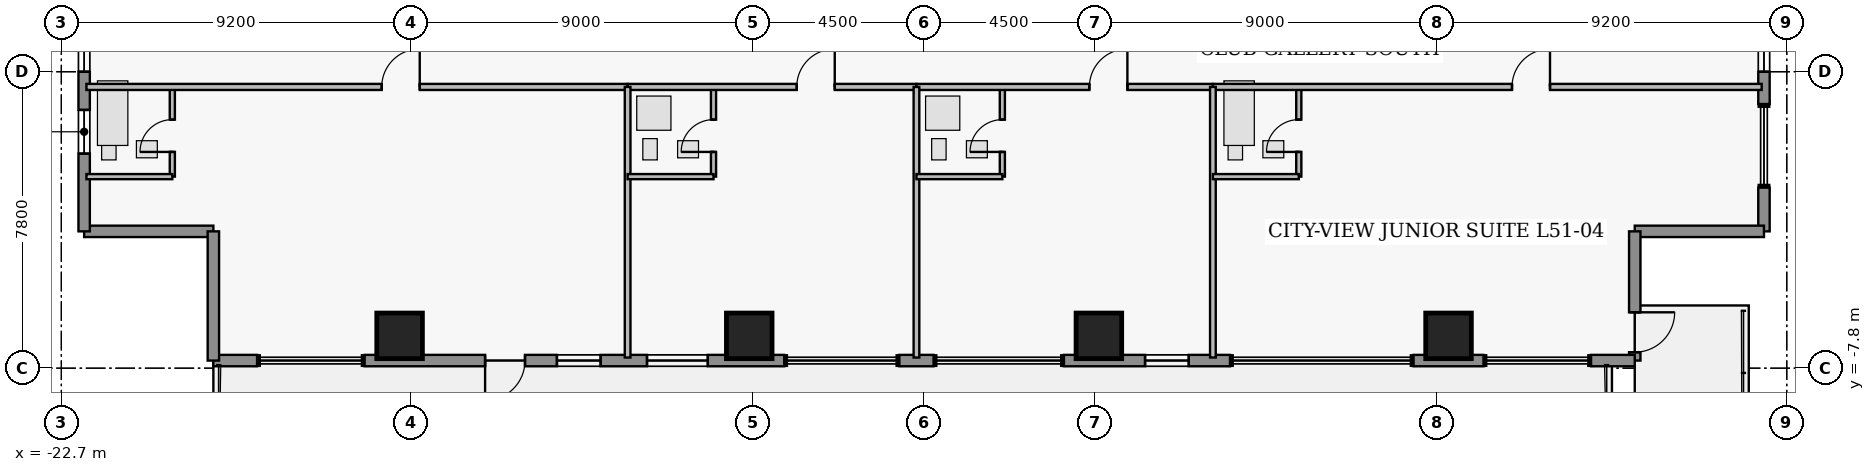
"""IFC4 building model, lengths in metres.
Left out: names, types, materials, properties, quantities, classifications, styles, units other than length and angle.
Written with IfcOpenShell. Run it as: python <this file> out.ifc"""

import sys

from ifc_helpers import new_model, si_unit, direction, frame, frame_2d, origin, origin_2d, place, context, subcontext, project, spatial, rectangle, extrude, element, fill, save


model = new_model("IFC4")
c1 = context("Model", 3, precision=1e-05, world=origin(), true_north=direction((0.0, 1.0)))
c2 = subcontext(c1, "Body", "Model", "MODEL_VIEW")
j1 = project(units=[si_unit("LENGTHUNIT", "METRE"), si_unit("PLANEANGLEUNIT", "RADIAN")], contexts=[c1])
p1 = place(None, origin())
s1 = spatial("IfcSite", under=j1, at=p1, CompositionType="ELEMENT")
p2 = place(p1, origin())
s2 = spatial("IfcBuilding", under=s1, at=p2, CompositionType="ELEMENT")
p3 = place(p2, frame((0.0, 0.0, 203.65)))
s3 = spatial("IfcBuildingStorey", under=s2, at=p3, CompositionType="ELEMENT", Elevation=203.65)
for number, where, z_axis, x_axis in (
    (1, (-13.8, -6.95, 0.0), (0.0, 0.0, 1.0), (1.0, 0.0, 0.0)),
    (2, (-4.6, -6.95, 0.0), (0.0, 0.0, 1.0), (1.0, 0.0, 0.0)),
    (3, (4.6, -6.95, 0.0), (0.0, 0.0, 1.0), (1.0, 0.0, 0.0)),
    (4, (13.8, -6.95, 0.0), (0.0, 0.0, 1.0), (1.0, 0.0, 0.0)),
):
    element("IfcColumn", number, at=place(p3, frame(where, z_axis=z_axis, x_axis=x_axis)), inside=s3, PredefinedType="COLUMN", context=c2, shape_type="SweptSolid", body=[
        extrude(rectangle(XDim=1.2, YDim=1.2, at=origin_2d()), origin(), (0.0, 0.0, 1.0), 3.75),
    ])
p4 = place(p3, frame((-18.7, -4.2, 0.0), z_axis=(0.0, 0.0, 1.0), x_axis=(-1.0, 0.0, 0.0)))
e5 = element("IfcWall", 5, at=p4, inside=s3, PredefinedType="STANDARD", context=c2, shape_type="SweptSolid", body=[
    extrude(rectangle(XDim=3.4, YDim=0.3, at=frame_2d((1.7, 0.0))), origin(), (0.0, 0.0, 1.0), 3.53),
])
p5 = place(p3, frame((-22.1, -4.2, 0.0), z_axis=(0.0, 0.0, 1.0), x_axis=(0.0, 1.0, 0.0)))
e6 = element("IfcWall", 6, at=p5, inside=s3, PredefinedType="STANDARD", context=c2, shape_type="SweptSolid", body=[
    extrude(rectangle(XDim=6.2, YDim=0.3, at=frame_2d((3.1, 0.0))), origin(), (0.0, 0.0, 1.0), 3.53),
])
p6 = place(p5, frame((2.045, 0.0, 0.95)))
e7 = element("IfcOpeningElement", 7, at=p6, cuts=e6, PredefinedType="OPENING", context=c2, shape_type="SweptSolid", body=[
    extrude(rectangle(XDim=1.15, YDim=1.55, at=frame_2d((0.575, 0.775))), frame((0.0, 0.16, 0.0), z_axis=(0.0, -1.0, 0.0), x_axis=(1.0, 0.0, 0.0)), (0.0, 0.0, 1.0), 0.32),
])
p7 = place(p5, frame((4.2, 0.0, 0.95)))
e8 = element("IfcOpeningElement", 8, at=p7, cuts=e6, PredefinedType="OPENING", context=c2, shape_type="SweptSolid", body=[
    extrude(rectangle(XDim=1.15, YDim=1.55, at=frame_2d((0.575, 0.775))), frame((0.0, 0.16, 0.0), z_axis=(0.0, -1.0, 0.0), x_axis=(1.0, 0.0, 0.0)), (0.0, 0.0, 1.0), 0.32),
])
p8 = place(p3, frame((22.1, 2.0, 0.0), z_axis=(0.0, 0.0, 1.0), x_axis=(0.0, -1.0, 0.0)))
e9 = element("IfcWall", 9, at=p8, inside=s3, PredefinedType="STANDARD", context=c2, shape_type="SweptSolid", body=[
    extrude(rectangle(XDim=2.85, YDim=0.3, at=frame_2d((1.425, 0.0))), origin(), (0.0, 0.0, 1.0), 3.53),
])
p9 = place(p8, frame((0.85, 0.0, 0.95)))
e10 = element("IfcOpeningElement", 10, at=p9, cuts=e9, PredefinedType="OPENING", context=c2, shape_type="SweptSolid", body=[
    extrude(rectangle(XDim=1.15, YDim=1.55, at=frame_2d((0.575, 0.775))), frame((0.0, 0.16, 0.0), z_axis=(0.0, -1.0, 0.0), x_axis=(1.0, 0.0, 0.0)), (0.0, 0.0, 1.0), 0.32),
])
p10 = place(p3, frame((22.1, -3.05, 0.0), z_axis=(0.0, 0.0, 1.0), x_axis=(0.0, -1.0, 0.0)))
e11 = element("IfcWall", 11, at=p10, inside=s3, PredefinedType="STANDARD", context=c2, shape_type="SweptSolid", body=[
    extrude(rectangle(XDim=1.15, YDim=0.3, at=frame_2d((0.575, 0.0))), origin(), (0.0, 0.0, 1.0), 3.53),
])
p11 = place(p3, frame((22.1, -4.2, 0.0), z_axis=(0.0, 0.0, 1.0), x_axis=(-1.0, 0.0, 0.0)))
e12 = element("IfcWall", 12, at=p11, inside=s3, PredefinedType="STANDARD", context=c2, shape_type="SweptSolid", body=[
    extrude(rectangle(XDim=3.4, YDim=0.3, at=frame_2d((1.7, 0.0))), origin(), (0.0, 0.0, 1.0), 3.53),
])
p12 = place(p3, frame((18.7, -4.2, 0.0), z_axis=(0.0, 0.0, 1.0), x_axis=(0.0, -1.0, 0.0)))
e13 = element("IfcWall", 13, at=p12, inside=s3, PredefinedType="STANDARD", context=c2, shape_type="SweptSolid", body=[
    extrude(rectangle(XDim=3.4, YDim=0.3, at=frame_2d((1.7, 0.0))), origin(), (0.0, 0.0, 1.0), 3.53),
])
p13 = place(p12, frame((2.13, 0.0, 0.0)))
e14 = element("IfcOpeningElement", 14, at=p13, cuts=e13, PredefinedType="OPENING", context=c2, shape_type="SweptSolid", body=[
    extrude(rectangle(XDim=1.05, YDim=2.2, at=frame_2d((0.525, 1.1))), frame((0.0, 0.16, 0.0), z_axis=(0.0, -1.0, 0.0), x_axis=(1.0, 0.0, 0.0)), (0.0, 0.0, 1.0), 0.32),
])
p14 = place(p3, frame((18.7, -7.6, 0.0), z_axis=(0.0, 0.0, 1.0), x_axis=(-1.0, 0.0, 0.0)))
e15 = element("IfcWall", 15, at=p14, inside=s3, PredefinedType="STANDARD", context=c2, shape_type="SweptSolid", body=[
    extrude(rectangle(XDim=1.15, YDim=0.3, at=frame_2d((0.575, 0.0))), origin(), (0.0, 0.0, 1.0), 3.53),
])
p15 = place(p3, frame((14.72, -7.6, 0.0), z_axis=(0.0, 0.0, 1.0), x_axis=(-1.0, 0.0, 0.0)))
e16 = element("IfcWall", 16, at=p15, inside=s3, PredefinedType="STANDARD", context=c2, shape_type="SweptSolid", body=[
    extrude(rectangle(XDim=1.84, YDim=0.3, at=frame_2d((0.92, 0.0))), origin(), (0.0, 0.0, 1.0), 3.53),
])
p16 = place(p3, frame((8.05, -7.6, 0.0), z_axis=(0.0, 0.0, 1.0), x_axis=(-1.0, 0.0, 0.0)))
e17 = element("IfcWall", 17, at=p16, inside=s3, PredefinedType="STANDARD", context=c2, shape_type="SweptSolid", body=[
    extrude(rectangle(XDim=4.37, YDim=0.3, at=frame_2d((2.185, 0.0))), origin(), (0.0, 0.0, 1.0), 3.53),
])
p17 = place(p16, frame((1.085, 0.0, 0.95)))
e18 = element("IfcOpeningElement", 18, at=p17, cuts=e17, PredefinedType="OPENING", context=c2, shape_type="SweptSolid", body=[
    extrude(rectangle(XDim=1.15, YDim=1.55, at=frame_2d((0.575, 0.775))), frame((0.0, 0.16, 0.0), z_axis=(0.0, -1.0, 0.0), x_axis=(1.0, 0.0, 0.0)), (0.0, 0.0, 1.0), 0.32),
])
p18 = place(p3, frame((0.25, -7.6, 0.0), z_axis=(0.0, 0.0, 1.0), x_axis=(-1.0, 0.0, 0.0)))
e19 = element("IfcWall", 19, at=p18, inside=s3, PredefinedType="STANDARD", context=c2, shape_type="SweptSolid", body=[
    extrude(rectangle(XDim=0.9, YDim=0.3, at=frame_2d((0.45, 0.0))), origin(), (0.0, 0.0, 1.0), 3.53),
])
p19 = place(p3, frame((-3.68, -7.6, 0.0), z_axis=(0.0, 0.0, 1.0), x_axis=(-1.0, 0.0, 0.0)))
e20 = element("IfcWall", 20, at=p19, inside=s3, PredefinedType="STANDARD", context=c2, shape_type="SweptSolid", body=[
    extrude(rectangle(XDim=11.04, YDim=0.3, at=frame_2d((5.52, 0.0))), origin(), (0.0, 0.0, 1.0), 3.53),
])
p20 = place(p19, frame((6.82, 0.0, 0.0)))
e21 = element("IfcOpeningElement", 21, at=p20, cuts=e20, PredefinedType="OPENING", context=c2, shape_type="SweptSolid", body=[
    extrude(rectangle(XDim=1.05, YDim=2.2, at=frame_2d((0.525, 1.1))), frame((0.0, 0.16, 0.0), z_axis=(0.0, -1.0, 0.0), x_axis=(1.0, 0.0, 0.0)), (0.0, 0.0, 1.0), 0.32),
])
p21 = place(p19, frame((2.01, 0.0, 0.85)))
e22 = element("IfcOpeningElement", 22, at=p21, cuts=e20, PredefinedType="OPENING", context=c2, shape_type="SweptSolid", body=[
    extrude(rectangle(XDim=1.6, YDim=1.8, at=frame_2d((0.8, 0.9))), frame((0.0, 0.16, 0.0), z_axis=(0.0, -1.0, 0.0), x_axis=(1.0, 0.0, 0.0)), (0.0, 0.0, 1.0), 0.32),
])
p22 = place(p19, frame((4.83, 0.0, 0.95)))
e23 = element("IfcOpeningElement", 23, at=p22, cuts=e20, PredefinedType="OPENING", context=c2, shape_type="SweptSolid", body=[
    extrude(rectangle(XDim=1.15, YDim=1.55, at=frame_2d((0.575, 0.775))), frame((0.0, 0.16, 0.0), z_axis=(0.0, -1.0, 0.0), x_axis=(1.0, 0.0, 0.0)), (0.0, 0.0, 1.0), 0.32),
])
p23 = place(p3, frame((-17.55, -7.6, 0.0), z_axis=(0.0, 0.0, 1.0), x_axis=(-1.0, 0.0, 0.0)))
e24 = element("IfcWall", 24, at=p23, inside=s3, PredefinedType="STANDARD", context=c2, shape_type="SweptSolid", body=[
    extrude(rectangle(XDim=1.15, YDim=0.3, at=frame_2d((0.575, 0.0))), origin(), (0.0, 0.0, 1.0), 3.53),
])
p24 = place(p3, frame((-18.7, -7.6, 0.0), z_axis=(0.0, 0.0, 1.0), x_axis=(0.0, 1.0, 0.0)))
e25 = element("IfcWall", 25, at=p24, inside=s3, PredefinedType="STANDARD", context=c2, shape_type="SweptSolid", body=[
    extrude(rectangle(XDim=3.4, YDim=0.3, at=frame_2d((1.7, 0.0))), origin(), (0.0, 0.0, 1.0), 3.53),
])
p25 = place(p3, frame((-19.78, -2.76, 0.0), z_axis=(0.0, 0.0, 1.0), x_axis=(0.0, 1.0, 0.0)))
e26 = element("IfcWall", 26, at=p25, inside=s3, PredefinedType="PLUMBINGWALL", context=c2, shape_type="SweptSolid", body=[
    extrude(rectangle(XDim=2.36, YDim=0.135, at=frame_2d((1.18, 0.0))), origin(), (0.0, 0.0, 1.0), 3.53),
])
p26 = place(p25, frame((0.65, 0.0, 0.0)))
e27 = element("IfcOpeningElement", 27, at=p26, cuts=e26, PredefinedType="OPENING", context=c2, shape_type="SweptSolid", body=[
    extrude(rectangle(XDim=0.85, YDim=2.1, at=frame_2d((0.425, 1.05))), frame((0.0, 0.077, 0.0), z_axis=(0.0, -1.0, 0.0), x_axis=(1.0, 0.0, 0.0)), (0.0, 0.0, 1.0), 0.155),
])
p27 = place(p3, frame((-22.04, -0.4, 0.0), z_axis=(0.0, 0.0, 1.0), x_axis=(1.0, 0.0, 0.0)))
e28 = element("IfcWall", 28, at=p27, inside=s3, PredefinedType="PARTITIONING", context=c2, shape_type="SweptSolid", body=[
    extrude(rectangle(XDim=14.24, YDim=0.16, at=frame_2d((7.12, 0.0))), origin(), (0.0, 0.0, 1.0), 3.53),
])
p28 = place(p27, frame((7.77, 0.0, 0.0)))
e29 = element("IfcOpeningElement", 29, at=p28, cuts=e28, PredefinedType="OPENING", context=c2, shape_type="SweptSolid", body=[
    extrude(rectangle(XDim=1.0, YDim=2.15, at=frame_2d((0.5, 1.075))), frame((0.0, 0.09, 0.0), z_axis=(0.0, -1.0, 0.0), x_axis=(1.0, 0.0, 0.0)), (0.0, 0.0, 1.0), 0.18),
])
p29 = place(p3, frame((-5.54, -2.76, 0.0), z_axis=(0.0, 0.0, 1.0), x_axis=(0.0, 1.0, 0.0)))
e30 = element("IfcWall", 30, at=p29, inside=s3, PredefinedType="PLUMBINGWALL", context=c2, shape_type="SweptSolid", body=[
    extrude(rectangle(XDim=2.36, YDim=0.135, at=frame_2d((1.18, 0.0))), origin(), (0.0, 0.0, 1.0), 3.53),
])
p30 = place(p29, frame((0.65, 0.0, 0.0)))
e31 = element("IfcOpeningElement", 31, at=p30, cuts=e30, PredefinedType="OPENING", context=c2, shape_type="SweptSolid", body=[
    extrude(rectangle(XDim=0.85, YDim=2.1, at=frame_2d((0.425, 1.05))), frame((0.0, 0.077, 0.0), z_axis=(0.0, -1.0, 0.0), x_axis=(1.0, 0.0, 0.0)), (0.0, 0.0, 1.0), 0.155),
])
p31 = place(p3, frame((-7.8, -0.4, 0.0), z_axis=(0.0, 0.0, 1.0), x_axis=(1.0, 0.0, 0.0)))
e32 = element("IfcWall", 32, at=p31, inside=s3, PredefinedType="PARTITIONING", context=c2, shape_type="SweptSolid", body=[
    extrude(rectangle(XDim=7.6, YDim=0.16, at=frame_2d((3.8, 0.0))), origin(), (0.0, 0.0, 1.0), 3.53),
])
p32 = place(p31, frame((4.45, 0.0, 0.0)))
e33 = element("IfcOpeningElement", 33, at=p32, cuts=e32, PredefinedType="OPENING", context=c2, shape_type="SweptSolid", body=[
    extrude(rectangle(XDim=1.0, YDim=2.15, at=frame_2d((0.5, 1.075))), frame((0.0, 0.09, 0.0), z_axis=(0.0, -1.0, 0.0), x_axis=(1.0, 0.0, 0.0)), (0.0, 0.0, 1.0), 0.18),
])
p33 = place(p3, frame((2.06, -2.76, 0.0), z_axis=(0.0, 0.0, 1.0), x_axis=(0.0, 1.0, 0.0)))
e34 = element("IfcWall", 34, at=p33, inside=s3, PredefinedType="PLUMBINGWALL", context=c2, shape_type="SweptSolid", body=[
    extrude(rectangle(XDim=2.36, YDim=0.135, at=frame_2d((1.18, 0.0))), origin(), (0.0, 0.0, 1.0), 3.53),
])
p34 = place(p33, frame((0.65, 0.0, 0.0)))
e35 = element("IfcOpeningElement", 35, at=p34, cuts=e34, PredefinedType="OPENING", context=c2, shape_type="SweptSolid", body=[
    extrude(rectangle(XDim=0.85, YDim=2.1, at=frame_2d((0.425, 1.05))), frame((0.0, 0.077, 0.0), z_axis=(0.0, -1.0, 0.0), x_axis=(1.0, 0.0, 0.0)), (0.0, 0.0, 1.0), 0.155),
])
p35 = place(p3, frame((-0.2, -0.4, 0.0), z_axis=(0.0, 0.0, 1.0), x_axis=(1.0, 0.0, 0.0)))
e36 = element("IfcWall", 36, at=p35, inside=s3, PredefinedType="PARTITIONING", context=c2, shape_type="SweptSolid", body=[
    extrude(rectangle(XDim=7.8, YDim=0.16, at=frame_2d((3.9, 0.0))), origin(), (0.0, 0.0, 1.0), 3.53),
])
p36 = place(p35, frame((4.55, 0.0, 0.0)))
e37 = element("IfcOpeningElement", 37, at=p36, cuts=e36, PredefinedType="OPENING", context=c2, shape_type="SweptSolid", body=[
    extrude(rectangle(XDim=1.0, YDim=2.15, at=frame_2d((0.5, 1.075))), frame((0.0, 0.09, 0.0), z_axis=(0.0, -1.0, 0.0), x_axis=(1.0, 0.0, 0.0)), (0.0, 0.0, 1.0), 0.18),
])
p37 = place(p3, frame((9.86, -2.76, 0.0), z_axis=(0.0, 0.0, 1.0), x_axis=(0.0, 1.0, 0.0)))
e38 = element("IfcWall", 38, at=p37, inside=s3, PredefinedType="PLUMBINGWALL", context=c2, shape_type="SweptSolid", body=[
    extrude(rectangle(XDim=2.36, YDim=0.135, at=frame_2d((1.18, 0.0))), origin(), (0.0, 0.0, 1.0), 3.53),
])
p38 = place(p37, frame((0.65, 0.0, 0.0)))
e39 = element("IfcOpeningElement", 39, at=p38, cuts=e38, PredefinedType="OPENING", context=c2, shape_type="SweptSolid", body=[
    extrude(rectangle(XDim=0.85, YDim=2.1, at=frame_2d((0.425, 1.05))), frame((0.0, 0.077, 0.0), z_axis=(0.0, -1.0, 0.0), x_axis=(1.0, 0.0, 0.0)), (0.0, 0.0, 1.0), 0.155),
])
p39 = place(p3, frame((7.6, -0.4, 0.0), z_axis=(0.0, 0.0, 1.0), x_axis=(1.0, 0.0, 0.0)))
e40 = element("IfcWall", 40, at=p39, inside=s3, PredefinedType="PARTITIONING", context=c2, shape_type="SweptSolid", body=[
    extrude(rectangle(XDim=14.44, YDim=0.16, at=frame_2d((7.22, 0.0))), origin(), (0.0, 0.0, 1.0), 3.53),
])
p40 = place(p39, frame((7.87, 0.0, 0.0)))
e41 = element("IfcOpeningElement", 41, at=p40, cuts=e40, PredefinedType="OPENING", context=c2, shape_type="SweptSolid", body=[
    extrude(rectangle(XDim=1.0, YDim=2.15, at=frame_2d((0.5, 1.075))), frame((0.0, 0.09, 0.0), z_axis=(0.0, -1.0, 0.0), x_axis=(1.0, 0.0, 0.0)), (0.0, 0.0, 1.0), 0.18),
])
p41 = place(p3, frame((-22.04, -2.76, 0.0), z_axis=(0.0, 0.0, 1.0), x_axis=(1.0, 0.0, 0.0)))
e42 = element("IfcWall", 42, at=p41, inside=s3, PredefinedType="PLUMBINGWALL", context=c2, shape_type="SweptSolid", body=[
    extrude(rectangle(XDim=2.26, YDim=0.135, at=frame_2d((1.13, 0.0))), origin(), (0.0, 0.0, 1.0), 3.53),
])
p42 = place(p3, frame((-7.8, -7.52, 0.0), z_axis=(0.0, 0.0, 1.0), x_axis=(0.0, 1.0, 0.0)))
e43 = element("IfcWall", 43, at=p42, inside=s3, PredefinedType="PARTITIONING", context=c2, shape_type="SweptSolid", body=[
    extrude(rectangle(XDim=7.12, YDim=0.15, at=frame_2d((3.56, 0.0))), origin(), (0.0, 0.0, 1.0), 3.53),
])
p43 = place(p3, frame((-7.8, -2.76, 0.0), z_axis=(0.0, 0.0, 1.0), x_axis=(1.0, 0.0, 0.0)))
e44 = element("IfcWall", 44, at=p43, inside=s3, PredefinedType="PLUMBINGWALL", context=c2, shape_type="SweptSolid", body=[
    extrude(rectangle(XDim=2.26, YDim=0.135, at=frame_2d((1.13, 0.0))), origin(), (0.0, 0.0, 1.0), 3.124),
])
p44 = place(p3, frame((-0.2, -7.52, 0.0), z_axis=(0.0, 0.0, 1.0), x_axis=(0.0, 1.0, 0.0)))
e45 = element("IfcWall", 45, at=p44, inside=s3, PredefinedType="PARTITIONING", context=c2, shape_type="SweptSolid", body=[
    extrude(rectangle(XDim=7.12, YDim=0.15, at=frame_2d((3.56, 0.0))), origin(), (0.0, 0.0, 1.0), 3.53),
])
p45 = place(p3, frame((-0.2, -2.76, 0.0), z_axis=(0.0, 0.0, 1.0), x_axis=(1.0, 0.0, 0.0)))
e46 = element("IfcWall", 46, at=p45, inside=s3, PredefinedType="PLUMBINGWALL", context=c2, shape_type="SweptSolid", body=[
    extrude(rectangle(XDim=2.26, YDim=0.135, at=frame_2d((1.13, 0.0))), origin(), (0.0, 0.0, 1.0), 3.124),
])
p46 = place(p3, frame((7.6, -7.52, 0.0), z_axis=(0.0, 0.0, 1.0), x_axis=(0.0, 1.0, 0.0)))
e47 = element("IfcWall", 47, at=p46, inside=s3, PredefinedType="PARTITIONING", context=c2, shape_type="SweptSolid", body=[
    extrude(rectangle(XDim=7.12, YDim=0.15, at=frame_2d((3.56, 0.0))), origin(), (0.0, 0.0, 1.0), 3.53),
])
p47 = place(p3, frame((7.6, -2.76, 0.0), z_axis=(0.0, 0.0, 1.0), x_axis=(1.0, 0.0, 0.0)))
e48 = element("IfcWall", 48, at=p47, inside=s3, PredefinedType="PLUMBINGWALL", context=c2, shape_type="SweptSolid", body=[
    extrude(rectangle(XDim=2.26, YDim=0.135, at=frame_2d((1.13, 0.0))), origin(), (0.0, 0.0, 1.0), 3.124),
])
p48 = place(p6, origin())
e49 = element("IfcWindow", 49, at=p48, inside=s3, PartitioningType="SINGLE_PANEL", PredefinedType="WINDOW", context=c2, shape_type="SweptSolid", body=[
    extrude(rectangle(XDim=1.15, YDim=1.55, at=frame_2d((0.575, 0.775))), frame((0.0, 0.03, 0.0), z_axis=(0.0, -1.0, 0.0), x_axis=(1.0, 0.0, 0.0)), (0.0, 0.0, 1.0), 0.06),
])
fill(e7, e49)
p49 = place(p7, origin())
e50 = element("IfcWindow", 50, at=p49, inside=s3, PartitioningType="SINGLE_PANEL", PredefinedType="WINDOW", context=c2, shape_type="SweptSolid", body=[
    extrude(rectangle(XDim=1.15, YDim=1.55, at=frame_2d((0.575, 0.775))), frame((0.0, 0.03, 0.0), z_axis=(0.0, -1.0, 0.0), x_axis=(1.0, 0.0, 0.0)), (0.0, 0.0, 1.0), 0.06),
])
fill(e8, e50)
p50 = place(p9, origin())
e51 = element("IfcWindow", 51, at=p50, inside=s3, PartitioningType="SINGLE_PANEL", PredefinedType="WINDOW", context=c2, shape_type="SweptSolid", body=[
    extrude(rectangle(XDim=1.15, YDim=1.55, at=frame_2d((0.575, 0.775))), frame((0.0, 0.03, 0.0), z_axis=(0.0, -1.0, 0.0), x_axis=(1.0, 0.0, 0.0)), (0.0, 0.0, 1.0), 0.06),
])
fill(e10, e51)
p51 = place(p13, origin())
e52 = element("IfcDoor", 52, at=p51, inside=s3, OperationType="SINGLE_SWING_LEFT", PredefinedType="DOOR", context=c2, shape_type="SweptSolid", body=[
    extrude(rectangle(XDim=1.05, YDim=2.2, at=frame_2d((0.525, 1.1))), frame((0.0, 0.025, 0.0), z_axis=(0.0, -1.0, 0.0), x_axis=(1.0, 0.0, 0.0)), (0.0, 0.0, 1.0), 0.05),
])
fill(e14, e52)
p52 = place(p17, origin())
e53 = element("IfcWindow", 53, at=p52, inside=s3, PartitioningType="SINGLE_PANEL", PredefinedType="WINDOW", context=c2, shape_type="SweptSolid", body=[
    extrude(rectangle(XDim=1.15, YDim=1.55, at=frame_2d((0.575, 0.775))), frame((0.0, 0.03, 0.0), z_axis=(0.0, -1.0, 0.0), x_axis=(1.0, 0.0, 0.0)), (0.0, 0.0, 1.0), 0.06),
])
fill(e18, e53)
p53 = place(p20, origin())
e54 = element("IfcDoor", 54, at=p53, inside=s3, OperationType="SINGLE_SWING_RIGHT", PredefinedType="DOOR", context=c2, shape_type="SweptSolid", body=[
    extrude(rectangle(XDim=1.05, YDim=2.2, at=frame_2d((0.525, 1.1))), frame((0.0, 0.025, 0.0), z_axis=(0.0, -1.0, 0.0), x_axis=(1.0, 0.0, 0.0)), (0.0, 0.0, 1.0), 0.05),
])
fill(e21, e54)
p54 = place(p21, origin())
e55 = element("IfcWindow", 55, at=p54, inside=s3, PartitioningType="SINGLE_PANEL", PredefinedType="WINDOW", context=c2, shape_type="SweptSolid", body=[
    extrude(rectangle(XDim=1.6, YDim=1.8, at=frame_2d((0.8, 0.9))), frame((0.0, 0.03, 0.0), z_axis=(0.0, -1.0, 0.0), x_axis=(1.0, 0.0, 0.0)), (0.0, 0.0, 1.0), 0.06),
])
fill(e22, e55)
p55 = place(p22, origin())
e56 = element("IfcWindow", 56, at=p55, inside=s3, PartitioningType="SINGLE_PANEL", PredefinedType="WINDOW", context=c2, shape_type="SweptSolid", body=[
    extrude(rectangle(XDim=1.15, YDim=1.55, at=frame_2d((0.575, 0.775))), frame((0.0, 0.03, 0.0), z_axis=(0.0, -1.0, 0.0), x_axis=(1.0, 0.0, 0.0)), (0.0, 0.0, 1.0), 0.06),
])
fill(e23, e56)
p56 = place(p26, origin())
e57 = element("IfcDoor", 57, at=p56, inside=s3, OperationType="SINGLE_SWING_LEFT", PredefinedType="DOOR", context=c2, shape_type="SweptSolid", body=[
    extrude(rectangle(XDim=0.85, YDim=2.1, at=frame_2d((0.425, 1.05))), frame((0.0, 0.025, 0.0), z_axis=(0.0, -1.0, 0.0), x_axis=(1.0, 0.0, 0.0)), (0.0, 0.0, 1.0), 0.05),
])
fill(e27, e57)
p57 = place(p28, origin())
e58 = element("IfcDoor", 58, at=p57, inside=s3, OperationType="SINGLE_SWING_RIGHT", PredefinedType="DOOR", context=c2, shape_type="SweptSolid", body=[
    extrude(rectangle(XDim=1.0, YDim=2.15, at=frame_2d((0.5, 1.075))), frame((0.0, 0.025, 0.0), z_axis=(0.0, -1.0, 0.0), x_axis=(1.0, 0.0, 0.0)), (0.0, 0.0, 1.0), 0.05),
])
fill(e29, e58)
p58 = place(p30, origin())
e59 = element("IfcDoor", 59, at=p58, inside=s3, OperationType="SINGLE_SWING_LEFT", PredefinedType="DOOR", context=c2, shape_type="SweptSolid", body=[
    extrude(rectangle(XDim=0.85, YDim=2.1, at=frame_2d((0.425, 1.05))), frame((0.0, 0.025, 0.0), z_axis=(0.0, -1.0, 0.0), x_axis=(1.0, 0.0, 0.0)), (0.0, 0.0, 1.0), 0.05),
])
fill(e31, e59)
p59 = place(p32, origin())
e60 = element("IfcDoor", 60, at=p59, inside=s3, OperationType="SINGLE_SWING_RIGHT", PredefinedType="DOOR", context=c2, shape_type="SweptSolid", body=[
    extrude(rectangle(XDim=1.0, YDim=2.15, at=frame_2d((0.5, 1.075))), frame((0.0, 0.025, 0.0), z_axis=(0.0, -1.0, 0.0), x_axis=(1.0, 0.0, 0.0)), (0.0, 0.0, 1.0), 0.05),
])
fill(e33, e60)
p60 = place(p34, origin())
e61 = element("IfcDoor", 61, at=p60, inside=s3, OperationType="SINGLE_SWING_LEFT", PredefinedType="DOOR", context=c2, shape_type="SweptSolid", body=[
    extrude(rectangle(XDim=0.85, YDim=2.1, at=frame_2d((0.425, 1.05))), frame((0.0, 0.025, 0.0), z_axis=(0.0, -1.0, 0.0), x_axis=(1.0, 0.0, 0.0)), (0.0, 0.0, 1.0), 0.05),
])
fill(e35, e61)
p61 = place(p36, origin())
e62 = element("IfcDoor", 62, at=p61, inside=s3, OperationType="SINGLE_SWING_RIGHT", PredefinedType="DOOR", context=c2, shape_type="SweptSolid", body=[
    extrude(rectangle(XDim=1.0, YDim=2.15, at=frame_2d((0.5, 1.075))), frame((0.0, 0.025, 0.0), z_axis=(0.0, -1.0, 0.0), x_axis=(1.0, 0.0, 0.0)), (0.0, 0.0, 1.0), 0.05),
])
fill(e37, e62)
p62 = place(p38, origin())
e63 = element("IfcDoor", 63, at=p62, inside=s3, OperationType="SINGLE_SWING_LEFT", PredefinedType="DOOR", context=c2, shape_type="SweptSolid", body=[
    extrude(rectangle(XDim=0.85, YDim=2.1, at=frame_2d((0.425, 1.05))), frame((0.0, 0.025, 0.0), z_axis=(0.0, -1.0, 0.0), x_axis=(1.0, 0.0, 0.0)), (0.0, 0.0, 1.0), 0.05),
])
fill(e39, e63)
p63 = place(p40, origin())
e64 = element("IfcDoor", 64, at=p63, inside=s3, OperationType="SINGLE_SWING_RIGHT", PredefinedType="DOOR", context=c2, shape_type="SweptSolid", body=[
    extrude(rectangle(XDim=1.0, YDim=2.15, at=frame_2d((0.5, 1.075))), frame((0.0, 0.025, 0.0), z_axis=(0.0, -1.0, 0.0), x_axis=(1.0, 0.0, 0.0)), (0.0, 0.0, 1.0), 0.05),
])
fill(e41, e64)
save(model, sys.argv[1])
